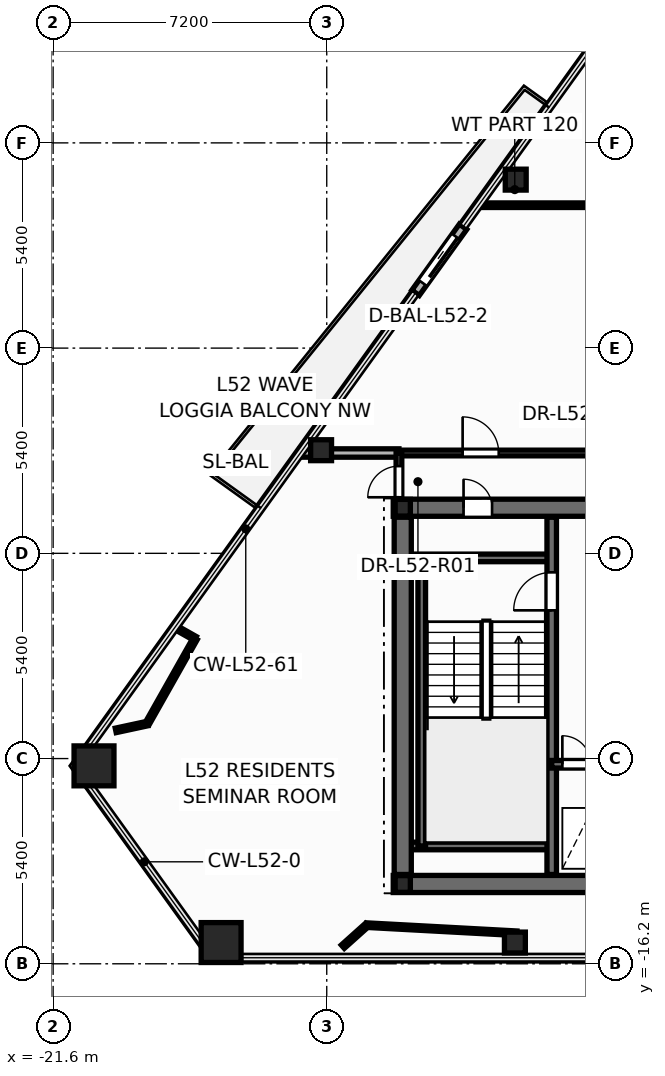
"""IFC4 building model, lengths in metres.
Left out: names, types, materials, properties, quantities, classifications, styles, units other than length and angle.
Written with IfcOpenShell. Run it as: python <this file> out.ifc"""

import sys

from ifc_helpers import new_model, si_unit, direction, frame, frame_2d, origin, origin_2d, place, context, subcontext, project, spatial, rectangle, hollow_rectangle, hollow_circle, i_section, extrude, element, fill, save


model = new_model("IFC4")
c1 = context("Model", 3, precision=1e-05, world=origin(), true_north=direction((0.0, 1.0)))
c2 = subcontext(c1, "Body", "Model", "MODEL_VIEW")
j1 = project(units=[si_unit("LENGTHUNIT", "METRE"), si_unit("PLANEANGLEUNIT", "RADIAN")], contexts=[c1])
p1 = place(None, origin())
s1 = spatial("IfcSite", under=j1, at=p1, CompositionType="ELEMENT")
p2 = place(p1, origin())
s2 = spatial("IfcBuilding", under=s1, at=p2, CompositionType="ELEMENT")
p3 = place(p2, frame((0.0, 0.0, 200.1)))
s3 = spatial("IfcBuildingStorey", under=s2, at=p3, CompositionType="ELEMENT", Elevation=200.1)
for number, where, z_axis, x_axis in (
    (1, (-20.524, -10.992, 0.0), (0.0, 0.0, 1.0), (1.0, 0.0, 0.0)),
    (2, (-17.18, -15.641, 0.0), (0.0, 0.0, 1.0), (1.0, 0.0, 0.0)),
):
    element("IfcColumn", number, at=place(p3, frame(where, z_axis=z_axis, x_axis=x_axis)), inside=s3, PredefinedType="COLUMN", context=c2, shape_type="SweptSolid", body=[
        extrude(hollow_rectangle(XDim=1.05, YDim=1.05, WallThickness=0.045, at=origin_2d()), origin(), (0.0, 0.0, 1.0), 3.6),
    ])
for number, where, z_axis, x_axis in (
    (3, (-9.449, -15.641, 0.0), (0.0, 0.0, 1.0), (1.0, 0.0, 0.0)),
    (4, (-9.427, 4.433, 0.0), (0.0, 0.0, 1.0), (1.0, 0.0, 0.0)),
    (5, (-14.549, -2.686, 0.0), (0.0, 0.0, 1.0), (1.0, 0.0, 0.0)),
):
    element("IfcColumn", number, at=place(p3, frame(where, z_axis=z_axis, x_axis=x_axis)), inside=s3, PredefinedType="COLUMN", context=c2, shape_type="SweptSolid", body=[
        extrude(hollow_circle(Radius=0.275, WallThickness=0.024, at=origin_2d()), origin(), (0.0, 0.0, 1.0), 3.6),
    ])
for number, where, z_axis, x_axis in (
    (6, (-12.4, -14.1, 0.0), (0.0, 0.0, 1.0), (1.0, 0.0, 0.0)),
    (7, (-12.4, -4.2, 0.0), (0.0, 0.0, 1.0), (1.0, 0.0, 0.0)),
):
    element("IfcColumn", number, at=place(p3, frame(where, z_axis=z_axis, x_axis=x_axis)), inside=s3, PredefinedType="COLUMN", context=c2, shape_type="SweptSolid", body=[
        extrude(i_section(OverallWidth=0.4, OverallDepth=0.44, WebThickness=0.028, FlangeThickness=0.04, at=origin_2d()), origin(), (0.0, 0.0, 1.0), 3.6),
    ])
p4 = place(p3, frame((-10.813, 3.192, -0.015), z_axis=(0.0, 0.0, 1.0), x_axis=(-0.583965085393, -0.811778774693, 0.0)))
e8 = element("IfcWall", 8, at=p4, inside=s3, PredefinedType="STANDARD", context=c2, shape_type="SweptSolid", body=[
    extrude(rectangle(XDim=2.14, YDim=0.24, at=frame_2d((1.07, 0.0))), origin(), (0.0, 0.0, 1.0), 2.802),
])
p5 = place(p4, frame((0.32, 0.0, 0.015)))
e9 = element("IfcOpeningElement", 9, at=p5, cuts=e8, PredefinedType="OPENING", context=c2, shape_type="SweptSolid", body=[
    extrude(rectangle(XDim=1.506, YDim=2.204, at=frame_2d((0.75, 1.102))), frame((0.0, 0.13, 0.0), z_axis=(0.0, -1.0, 0.0), x_axis=(1.0, 0.0, 0.0)), (0.0, 0.0, 1.0), 0.26),
])
p6 = place(p3, frame((-12.65, -14.1, 0.0), z_axis=(0.0, 0.0, 1.0), x_axis=(1.0, 0.0, 0.0)))
e10 = element("IfcWall", 10, at=p6, inside=s3, PredefinedType="SHEAR", context=c2, shape_type="SweptSolid", body=[
    extrude(rectangle(XDim=25.3, YDim=0.45, at=frame_2d((12.65, 0.0))), origin(), (0.0, 0.0, 1.0), 3.6),
])
p7 = place(p3, frame((-12.65, -4.2, 0.0), z_axis=(0.0, 0.0, 1.0), x_axis=(1.0, 0.0, 0.0)))
e11 = element("IfcWall", 11, at=p7, inside=s3, PredefinedType="SHEAR", context=c2, shape_type="SweptSolid", body=[
    extrude(rectangle(XDim=25.3, YDim=0.45, at=frame_2d((12.65, 0.0))), origin(), (0.0, 0.0, 1.0), 3.6),
])
p8 = place(p7, frame((1.85, 0.0, 0.0)))
e12 = element("IfcOpeningElement", 12, at=p8, cuts=e11, PredefinedType="OPENING", context=c2, shape_type="SweptSolid", body=[
    extrude(rectangle(XDim=0.756, YDim=2.054, at=frame_2d((0.375, 1.027))), frame((0.0, 0.235, 0.0), z_axis=(0.0, -1.0, 0.0), x_axis=(1.0, 0.0, 0.0)), (0.0, 0.0, 1.0), 0.47),
])
p9 = place(p7, frame((21.85, 0.0, 0.0)))
e13 = element("IfcOpeningElement", 13, at=p9, cuts=e11, PredefinedType="OPENING", context=c2, shape_type="SweptSolid", body=[
    extrude(rectangle(XDim=0.756, YDim=2.054, at=frame_2d((0.375, 1.027))), frame((0.0, 0.235, 0.0), z_axis=(0.0, -1.0, 0.0), x_axis=(1.0, 0.0, 0.0)), (0.0, 0.0, 1.0), 0.47),
])
p10 = place(p7, frame((23.5, 0.0, 0.0)))
e14 = element("IfcOpeningElement", 14, at=p10, cuts=e11, PredefinedType="OPENING", context=c2, shape_type="SweptSolid", body=[
    extrude(rectangle(XDim=0.756, YDim=2.054, at=frame_2d((0.375, 1.027))), frame((0.0, 0.235, 0.0), z_axis=(0.0, -1.0, 0.0), x_axis=(1.0, 0.0, 0.0)), (0.0, 0.0, 1.0), 0.47),
])
p11 = place(p7, frame((5.85, 0.0, 0.0)))
e15 = element("IfcOpeningElement", 15, at=p11, cuts=e11, PredefinedType="OPENING", context=c2, shape_type="SweptSolid", body=[
    extrude(rectangle(XDim=1.006, YDim=2.104, at=frame_2d((0.5, 1.052))), frame((0.0, 0.235, 0.0), z_axis=(0.0, -1.0, 0.0), x_axis=(1.0, 0.0, 0.0)), (0.0, 0.0, 1.0), 0.47),
])
p12 = place(p7, frame((10.35, 0.0, 0.0)))
e16 = element("IfcOpeningElement", 16, at=p12, cuts=e11, PredefinedType="OPENING", context=c2, shape_type="SweptSolid", body=[
    extrude(rectangle(XDim=1.406, YDim=2.154, at=frame_2d((0.7, 1.077))), frame((0.0, 0.235, 0.0), z_axis=(0.0, -1.0, 0.0), x_axis=(1.0, 0.0, 0.0)), (0.0, 0.0, 1.0), 0.47),
])
p13 = place(p7, frame((18.45, 0.0, 0.0)))
e17 = element("IfcOpeningElement", 17, at=p13, cuts=e11, PredefinedType="OPENING", context=c2, shape_type="SweptSolid", body=[
    extrude(rectangle(XDim=1.006, YDim=2.104, at=frame_2d((0.5, 1.052))), frame((0.0, 0.235, 0.0), z_axis=(0.0, -1.0, 0.0), x_axis=(1.0, 0.0, 0.0)), (0.0, 0.0, 1.0), 0.47),
])
for number, where, z_axis, x_axis in (
    (18, (-12.35, -5.52, 0.0), (0.0, 0.0, 1.0), (1.0, 0.0, 0.0)),
    (19, (-12.35, -13.1, 0.0), (0.0, 0.0, 1.0), (1.0, 0.0, 0.0)),
):
    element("IfcWall", number, at=place(p3, frame(where, z_axis=z_axis, x_axis=x_axis)), inside=s3, PredefinedType="SOLIDWALL", context=c2, shape_type="SweptSolid", body=[
        extrude(rectangle(XDim=3.87, YDim=0.2, at=frame_2d((1.935, 0.0))), origin(), (0.0, 0.0, 1.0), 3.6),
    ])
p14 = place(p3, frame((-11.9, -13.1, 0.0), z_axis=(0.0, 0.0, 1.0), x_axis=(0.0, 1.0, 0.0)))
e20 = element("IfcWall", 20, at=p14, inside=s3, PredefinedType="SOLIDWALL", context=c2, shape_type="SweptSolid", body=[
    extrude(rectangle(XDim=7.58, YDim=0.2, at=frame_2d((3.79, 0.0))), origin(), (0.0, 0.0, 1.0), 3.6),
])
p15 = place(p3, frame((-8.48, -13.85, 0.0), z_axis=(0.0, 0.0, 1.0), x_axis=(0.0, 1.0, 0.0)))
e21 = element("IfcWall", 21, at=p15, inside=s3, PredefinedType="SHEAR", context=c2, shape_type="SweptSolid", body=[
    extrude(rectangle(XDim=9.4, YDim=0.25, at=frame_2d((4.7, 0.0))), origin(), (0.0, 0.0, 1.0), 3.6),
])
p16 = place(p15, frame((6.95, 0.0, 0.0)))
e22 = element("IfcOpeningElement", 22, at=p16, cuts=e21, PredefinedType="OPENING", context=c2, shape_type="SweptSolid", body=[
    extrude(rectangle(XDim=1.006, YDim=2.104, at=frame_2d((0.5, 1.052))), frame((0.0, 0.135, 0.0), z_axis=(0.0, -1.0, 0.0), x_axis=(1.0, 0.0, 0.0)), (0.0, 0.0, 1.0), 0.27),
])
p17 = place(p3, frame((-8.48, -10.95, 0.0), z_axis=(0.0, 0.0, 1.0), x_axis=(1.0, 0.0, 0.0)))
e23 = element("IfcWall", 23, at=p17, inside=s3, PredefinedType="SOLIDWALL", context=c2, shape_type="SweptSolid", body=[
    extrude(rectangle(XDim=3.36, YDim=0.2, at=frame_2d((1.68, 0.0))), origin(), (0.0, 0.0, 1.0), 3.6),
])
p18 = place(p17, frame((0.28, 0.0, 0.0)))
e24 = element("IfcOpeningElement", 24, at=p18, cuts=e23, PredefinedType="OPENING", context=c2, shape_type="SweptSolid", body=[
    extrude(rectangle(XDim=0.756, YDim=2.054, at=frame_2d((0.375, 1.027))), frame((0.0, 0.11, 0.0), z_axis=(0.0, -1.0, 0.0), x_axis=(1.0, 0.0, 0.0)), (0.0, 0.0, 1.0), 0.22),
])
p19 = place(p17, frame((1.85, 0.0, 0.0)))
e25 = element("IfcOpeningElement", 25, at=p19, cuts=e23, PredefinedType="OPENING", context=c2, shape_type="SweptSolid", body=[
    extrude(rectangle(XDim=1.106, YDim=2.104, at=frame_2d((0.55, 1.052))), frame((0.0, 0.11, 0.0), z_axis=(0.0, -1.0, 0.0), x_axis=(1.0, 0.0, 0.0)), (0.0, 0.0, 1.0), 0.22),
])
p20 = place(p3, frame((-12.4, -13.85, 0.0), z_axis=(0.0, 0.0, 1.0), x_axis=(0.0, 1.0, 0.0)))
e26 = element("IfcWall", 26, at=p20, inside=s3, PredefinedType="SHEAR", context=c2, shape_type="SweptSolid", body=[
    extrude(rectangle(XDim=9.4, YDim=0.45, at=frame_2d((4.7, 0.0))), origin(), (0.0, 0.0, 1.0), 3.6),
])
p21 = place(p3, frame((-12.5, -2.76, 0.0), z_axis=(0.0, 0.0, 1.0), x_axis=(1.0, 0.0, 0.0)))
e27 = element("IfcWall", 27, at=p21, inside=s3, PredefinedType="PARTITIONING", context=c2, shape_type="SweptSolid", body=[
    extrude(rectangle(XDim=12.16, YDim=0.15, at=frame_2d((6.08, 0.0))), origin(), (0.0, 0.0, 1.0), 2.32),
])
p22 = place(p21, frame((1.676, 0.0, 0.0)))
e28 = element("IfcOpeningElement", 28, at=p22, cuts=e27, PredefinedType="OPENING", context=c2, shape_type="SweptSolid", body=[
    extrude(rectangle(XDim=0.956, YDim=2.104, at=frame_2d((0.475, 1.052))), frame((0.0, 0.085, 0.0), z_axis=(0.0, -1.0, 0.0), x_axis=(1.0, 0.0, 0.0)), (0.0, 0.0, 1.0), 0.17),
])
p23 = place(p3, frame((-10.404, 3.76, 0.0), z_axis=(0.0, 0.0, 1.0), x_axis=(1.0, 0.0, 0.0)))
e29 = element("IfcWall", 29, at=p23, inside=s3, PredefinedType="PARTITIONING", context=c2, shape_type="SweptSolid", body=[
    extrude(rectangle(XDim=6.344, YDim=0.12, at=frame_2d((3.172, 0.0))), origin(), (0.0, 0.0, 1.0), 2.32),
])
p24 = place(p23, frame((4.748, 0.0, 0.0)))
e30 = element("IfcOpeningElement", 30, at=p24, cuts=e29, PredefinedType="OPENING", context=c2, shape_type="SweptSolid", body=[
    extrude(rectangle(XDim=0.926, YDim=2.104, at=frame_2d((0.46, 1.052))), frame((0.0, 0.07, 0.0), z_axis=(0.0, -1.0, 0.0), x_axis=(1.0, 0.0, 0.0)), (0.0, 0.0, 1.0), 0.14),
])
p25 = place(p3, frame((-13.345, -15.183, 0.0), z_axis=(0.0, 0.0, 1.0), x_axis=(0.998542273278, -0.053975258015, 0.0)))
e31 = element("IfcWall", 31, at=p25, inside=s3, PredefinedType="PARTITIONING", context=c2, shape_type="SweptSolid", body=[
    extrude(rectangle(XDim=3.953, YDim=0.12, at=frame_2d((1.977, 0.0))), origin(), (0.0, 0.0, 1.0), 2.32),
])
p26 = place(p3, frame((-15.095, -2.76, 0.0), z_axis=(0.0, 0.0, 1.0), x_axis=(1.0, 0.0, 0.0)))
e32 = element("IfcWall", 32, at=p26, inside=s3, PredefinedType="PARTITIONING", context=c2, shape_type="SweptSolid", body=[
    extrude(rectangle(XDim=2.595, YDim=0.22, at=frame_2d((1.297, 0.0))), origin(), (0.0, 0.0, 1.0), 2.32),
])
p27 = place(p3, frame((-17.86, -7.642, 0.0), z_axis=(0.0, 0.0, 1.0), x_axis=(-0.491806907355, -0.870704293017, 0.0)))
e33 = element("IfcWall", 33, at=p27, inside=s3, PredefinedType="PARTITIONING", context=c2, shape_type="SweptSolid", body=[
    extrude(rectangle(XDim=2.571, YDim=0.12, at=frame_2d((1.286, 0.0))), origin(), (0.0, 0.0, 1.0), 2.32),
])
p28 = place(p3, frame((-12.5, -4.24, 0.0), z_axis=(0.0, 0.0, 1.0), x_axis=(0.0, 1.0, 0.0)))
e34 = element("IfcWall", 34, at=p28, inside=s3, PredefinedType="PARTITIONING", context=c2, shape_type="SweptSolid", body=[
    extrude(rectangle(XDim=1.48, YDim=0.15, at=frame_2d((0.74, 0.0))), origin(), (0.0, 0.0, 1.0), 2.32),
])
p29 = place(p28, frame((0.315, 0.0, 0.0)))
e35 = element("IfcOpeningElement", 35, at=p29, cuts=e34, PredefinedType="OPENING", context=c2, shape_type="SweptSolid", body=[
    extrude(rectangle(XDim=0.826, YDim=2.104, at=frame_2d((0.41, 1.052))), frame((0.0, 0.085, 0.0), z_axis=(0.0, -1.0, 0.0), x_axis=(1.0, 0.0, 0.0)), (0.0, 0.0, 1.0), 0.17),
])
p30 = place(p3, frame((-13.978, -15.75, 0.0), z_axis=(0.0, 0.0, 1.0), x_axis=(0.744707356433, 0.667391154627, 0.0)))
e36 = element("IfcWall", 36, at=p30, inside=s3, PredefinedType="PARTITIONING", context=c2, shape_type="SweptSolid", body=[
    extrude(rectangle(XDim=0.849, YDim=0.12, at=frame_2d((0.425, 0.0))), origin(), (0.0, 0.0, 1.0), 2.787),
])
p31 = place(p3, frame((-19.124, -9.88, 0.0), z_axis=(0.0, 0.0, 1.0), x_axis=(-0.977582693279, -0.210551841127, 0.0)))
e37 = element("IfcWall", 37, at=p31, inside=s3, PredefinedType="PARTITIONING", context=c2, shape_type="SweptSolid", body=[
    extrude(rectangle(XDim=0.848, YDim=0.12, at=frame_2d((0.424, 0.0))), origin(), (0.0, 0.0, 1.0), 2.32),
])
p32 = place(p3, frame((-9.398, -15.396, 0.0), z_axis=(0.0, 0.0, 1.0), x_axis=(-0.053788890406, -0.99855232976, 0.0)))
e38 = element("IfcWall", 38, at=p32, inside=s3, PredefinedType="PARTITIONING", context=c2, shape_type="SweptSolid", body=[
    extrude(rectangle(XDim=0.635, YDim=0.12, at=frame_2d((0.318, 0.0))), origin(), (0.0, 0.0, 1.0), 2.32),
])
p33 = place(p3, frame((-18.382, -7.347, 0.0), z_axis=(0.0, 0.0, 1.0), x_axis=(0.870737162202, -0.491748710584, 0.0)))
e39 = element("IfcWall", 39, at=p33, inside=s3, PredefinedType="PARTITIONING", context=c2, shape_type="SweptSolid", body=[
    extrude(rectangle(XDim=0.6, YDim=0.12, at=frame_2d((0.3, 0.0))), origin(), (0.0, 0.0, 1.0), 2.787),
])
p34 = place(p5, origin())
e40 = element("IfcDoor", 40, at=p34, inside=s3, OperationType="SLIDING_TO_RIGHT", PredefinedType="DOOR", context=c2, shape_type="SweptSolid", body=[
    extrude(rectangle(XDim=1.5, YDim=2.2, at=frame_2d((0.75, 1.1))), frame((0.0, 0.025, 0.0), z_axis=(0.0, -1.0, 0.0), x_axis=(1.0, 0.0, 0.0)), (0.0, 0.0, 1.0), 0.05),
])
fill(e9, e40)
p35 = place(p16, origin())
e41 = element("IfcDoor", 41, at=p35, inside=s3, OperationType="SINGLE_SWING_LEFT", PredefinedType="DOOR", context=c2, shape_type="SweptSolid", body=[
    extrude(rectangle(XDim=1.0, YDim=2.1, at=frame_2d((0.5, 1.05))), frame((0.0, 0.025, 0.0), z_axis=(0.0, -1.0, 0.0), x_axis=(1.0, 0.0, 0.0)), (0.0, 0.0, 1.0), 0.05),
])
fill(e22, e41)
p36 = place(p18, origin())
e42 = element("IfcDoor", 42, at=p36, inside=s3, OperationType="SINGLE_SWING_LEFT", PredefinedType="DOOR", context=c2, shape_type="SweptSolid", body=[
    extrude(rectangle(XDim=0.75, YDim=2.05, at=frame_2d((0.375, 1.025))), frame((0.0, 0.025, 0.0), z_axis=(0.0, -1.0, 0.0), x_axis=(1.0, 0.0, 0.0)), (0.0, 0.0, 1.0), 0.05),
])
fill(e24, e42)
p37 = place(p8, origin())
e43 = element("IfcDoor", 43, at=p37, inside=s3, OperationType="SINGLE_SWING_LEFT", PredefinedType="DOOR", context=c2, shape_type="SweptSolid", body=[
    extrude(rectangle(XDim=0.75, YDim=2.05, at=frame_2d((0.375, 1.025))), frame((0.0, 0.025, 0.0), z_axis=(0.0, -1.0, 0.0), x_axis=(1.0, 0.0, 0.0)), (0.0, 0.0, 1.0), 0.05),
])
fill(e12, e43)
p38 = place(p29, origin())
e44 = element("IfcDoor", 44, at=p38, inside=s3, OperationType="SINGLE_SWING_LEFT", PredefinedType="DOOR", context=c2, shape_type="SweptSolid", body=[
    extrude(rectangle(XDim=0.82, YDim=2.1, at=frame_2d((0.41, 1.05))), frame((0.0, 0.025, 0.0), z_axis=(0.0, -1.0, 0.0), x_axis=(1.0, 0.0, 0.0)), (0.0, 0.0, 1.0), 0.05),
])
fill(e35, e44)
p39 = place(p22, origin())
e45 = element("IfcDoor", 45, at=p39, inside=s3, OperationType="SINGLE_SWING_LEFT", PredefinedType="DOOR", context=c2, shape_type="SweptSolid", body=[
    extrude(rectangle(XDim=0.95, YDim=2.1, at=frame_2d((0.475, 1.05))), frame((0.0, 0.025, 0.0), z_axis=(0.0, -1.0, 0.0), x_axis=(1.0, 0.0, 0.0)), (0.0, 0.0, 1.0), 0.05),
])
fill(e28, e45)
save(model, sys.argv[1])
